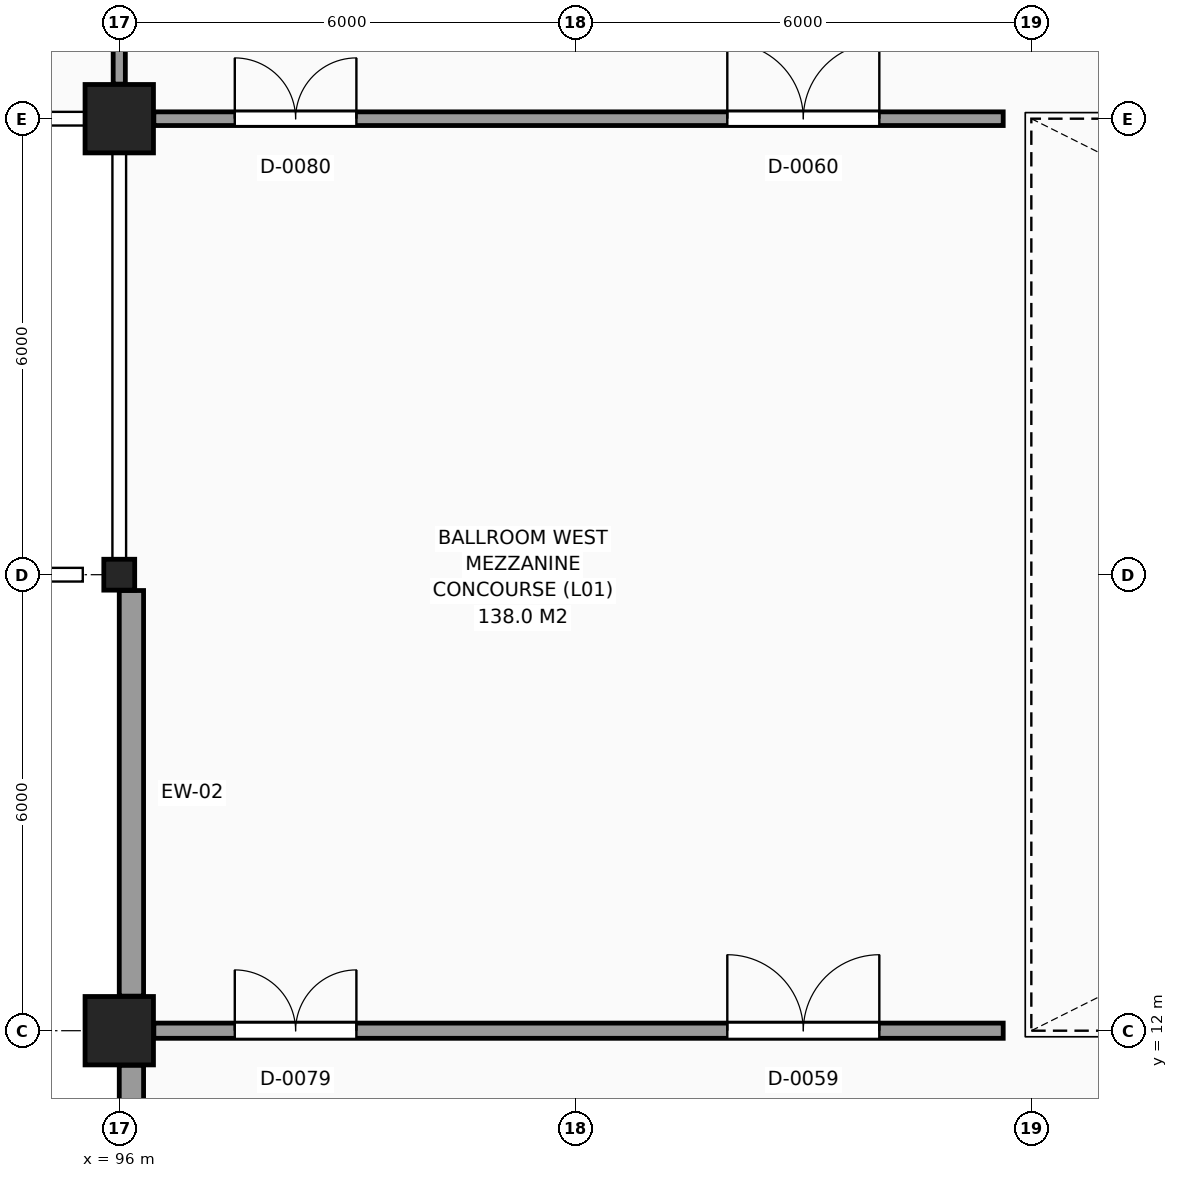
"""IFC4 building model, lengths in metres.
Left out: names, types, materials, properties, quantities, classifications, styles, units other than length and angle.
Written with IfcOpenShell. Run it as: python <this file> out.ifc"""

import sys

from ifc_helpers import new_model, si_unit, direction, frame, frame_2d, origin, origin_2d, place, context, subcontext, project, spatial, rectangle, hollow_circle, extrude, element, fill, save


model = new_model("IFC4")
c1 = context("Model", 3, precision=1e-05, world=origin(), true_north=direction((0.0, 1.0)))
c2 = subcontext(c1, "Body", "Model", "MODEL_VIEW")
j1 = project(units=[si_unit("LENGTHUNIT", "METRE"), si_unit("PLANEANGLEUNIT", "RADIAN")], contexts=[c1])
p1 = place(None, origin())
s1 = spatial("IfcSite", under=j1, at=p1, CompositionType="ELEMENT")
p2 = place(p1, origin())
s2 = spatial("IfcBuilding", under=s1, at=p2, CompositionType="ELEMENT")
p3 = place(p2, frame((0.0, 0.0, 6.0)))
s3 = spatial("IfcBuildingStorey", under=s2, at=p3, CompositionType="ELEMENT", Elevation=6.0)
p4 = place(p3, frame((96.0, 12.0, 0.0), z_axis=(0.0, 0.0, 1.0), x_axis=(1.0, 0.0, 0.0)))
e1 = element("IfcColumn", 1, at=p4, inside=s3, PredefinedType="COLUMN", context=c2, shape_type="SweptSolid", body=[
    extrude(rectangle(XDim=0.9, YDim=0.9, at=origin_2d()), origin(), (0.0, 0.0, 1.0), 4.5),
])
p5 = place(p3, frame((96.0, 18.0, 0.0), z_axis=(0.0, 0.0, 1.0), x_axis=(1.0, 0.0, 0.0)))
e2 = element("IfcColumn", 2, at=p5, inside=s3, PredefinedType="COLUMN", context=c2, shape_type="SweptSolid", body=[
    extrude(hollow_circle(Radius=0.203, WallThickness=0.02, at=origin_2d()), origin(), (0.0, 0.0, 1.0), 4.5),
])
p6 = place(p3, frame((96.0, 24.0, 0.0), z_axis=(0.0, 0.0, 1.0), x_axis=(1.0, 0.0, 0.0)))
e3 = element("IfcColumn", 3, at=p6, inside=s3, PredefinedType="COLUMN", context=c2, shape_type="SweptSolid", body=[
    extrude(rectangle(XDim=0.9, YDim=0.9, at=origin_2d()), origin(), (0.0, 0.0, 1.0), 4.5),
])
p7 = place(p3, frame((96.16, 17.792, 0.0), z_axis=(0.0, 0.0, 1.0), x_axis=(0.0, -1.0, 0.0)))
e4 = element("IfcWall", 4, at=p7, inside=s3, PredefinedType="SOLIDWALL", context=c2, shape_type="SweptSolid", body=[
    extrude(rectangle(XDim=5.337, YDim=0.32, at=frame_2d((2.668, 0.0))), origin(), (0.0, 0.0, 1.0), 3.47),
])
p8 = place(p3, frame((96.16, 11.545, 0.0), z_axis=(0.0, 0.0, 1.0), x_axis=(0.0, -1.0, 0.0)))
e5 = element("IfcWall", 5, at=p8, inside=s3, PredefinedType="SOLIDWALL", context=c2, shape_type="SweptSolid", body=[
    extrude(rectangle(XDim=5.09, YDim=0.32, at=frame_2d((2.545, 0.0))), origin(), (0.0, 0.0, 1.0), 3.47),
])
p9 = place(p3, frame((96.0, 24.455, 0.0), z_axis=(0.0, 0.0, 1.0), x_axis=(0.0, 1.0, 0.0)))
e6 = element("IfcWall", 6, at=p9, inside=s3, PredefinedType="PARTITIONING", context=c2, shape_type="SweptSolid", body=[
    extrude(rectangle(XDim=5.09, YDim=0.16, at=frame_2d((2.545, 0.0))), origin(), (0.0, 0.0, 1.0), 3.42),
])
p10 = place(p3, frame((96.455, 12.0, 0.0), z_axis=(0.0, 0.0, 1.0), x_axis=(1.0, 0.0, 0.0)))
e7 = element("IfcWall", 7, at=p10, inside=s3, PredefinedType="PARTITIONING", context=c2, shape_type="SweptSolid", body=[
    extrude(rectangle(XDim=11.175, YDim=0.2, at=frame_2d((5.587, 0.0))), origin(), (0.0, 0.0, 1.0), 4.22),
])
p11 = place(p10, frame((7.545, 0.0, 0.0)))
e8 = element("IfcOpeningElement", 8, at=p11, cuts=e7, PredefinedType="OPENING", context=c2, shape_type="SweptSolid", body=[
    extrude(rectangle(XDim=2.0, YDim=2.45, at=frame_2d((1.0, 1.225))), frame((0.0, 0.11, 0.0), z_axis=(0.0, -1.0, 0.0), x_axis=(1.0, 0.0, 0.0)), (0.0, 0.0, 1.0), 0.22),
])
p12 = place(p10, frame((1.065, 0.0, 0.0)))
e9 = element("IfcOpeningElement", 9, at=p12, cuts=e7, PredefinedType="OPENING", context=c2, shape_type="SweptSolid", body=[
    extrude(rectangle(XDim=1.6, YDim=2.25, at=frame_2d((0.8, 1.125))), frame((0.0, 0.11, 0.0), z_axis=(0.0, -1.0, 0.0), x_axis=(1.0, 0.0, 0.0)), (0.0, 0.0, 1.0), 0.22),
])
p13 = place(p3, frame((96.455, 24.0, 0.0), z_axis=(0.0, 0.0, 1.0), x_axis=(1.0, 0.0, 0.0)))
e10 = element("IfcWall", 10, at=p13, inside=s3, PredefinedType="PARTITIONING", context=c2, shape_type="SweptSolid", body=[
    extrude(rectangle(XDim=11.175, YDim=0.18, at=frame_2d((5.587, 0.0))), origin(), (0.0, 0.0, 1.0), 4.22),
])
p14 = place(p13, frame((7.545, 0.0, 0.0)))
e11 = element("IfcOpeningElement", 11, at=p14, cuts=e10, PredefinedType="OPENING", context=c2, shape_type="SweptSolid", body=[
    extrude(rectangle(XDim=2.0, YDim=2.45, at=frame_2d((1.0, 1.225))), frame((0.0, 0.1, 0.0), z_axis=(0.0, -1.0, 0.0), x_axis=(1.0, 0.0, 0.0)), (0.0, 0.0, 1.0), 0.2),
])
p15 = place(p13, frame((1.065, 0.0, 0.0)))
e12 = element("IfcOpeningElement", 12, at=p15, cuts=e10, PredefinedType="OPENING", context=c2, shape_type="SweptSolid", body=[
    extrude(rectangle(XDim=1.6, YDim=2.25, at=frame_2d((0.8, 1.125))), frame((0.0, 0.1, 0.0), z_axis=(0.0, -1.0, 0.0), x_axis=(1.0, 0.0, 0.0)), (0.0, 0.0, 1.0), 0.2),
])
p16 = place(p11, origin())
e13 = element("IfcDoor", 13, at=p16, inside=s3, OperationType="DOUBLE_DOOR_SINGLE_SWING", PredefinedType="DOOR", context=c2, shape_type="SweptSolid", body=[
    extrude(rectangle(XDim=2.0, YDim=2.45, at=frame_2d((1.0, 1.225))), frame((0.0, 0.025, 0.0), z_axis=(0.0, -1.0, 0.0), x_axis=(1.0, 0.0, 0.0)), (0.0, 0.0, 1.0), 0.05),
])
fill(e8, e13)
p17 = place(p14, origin())
e14 = element("IfcDoor", 14, at=p17, inside=s3, OperationType="DOUBLE_DOOR_SINGLE_SWING", PredefinedType="DOOR", context=c2, shape_type="SweptSolid", body=[
    extrude(rectangle(XDim=2.0, YDim=2.45, at=frame_2d((1.0, 1.225))), frame((0.0, 0.025, 0.0), z_axis=(0.0, -1.0, 0.0), x_axis=(1.0, 0.0, 0.0)), (0.0, 0.0, 1.0), 0.05),
])
fill(e11, e14)
p18 = place(p12, origin())
e15 = element("IfcDoor", 15, at=p18, inside=s3, OperationType="DOUBLE_DOOR_SINGLE_SWING", PredefinedType="DOOR", context=c2, shape_type="SweptSolid", body=[
    extrude(rectangle(XDim=1.6, YDim=2.25, at=frame_2d((0.8, 1.125))), frame((0.0, 0.025, 0.0), z_axis=(0.0, -1.0, 0.0), x_axis=(1.0, 0.0, 0.0)), (0.0, 0.0, 1.0), 0.05),
])
fill(e9, e15)
p19 = place(p15, origin())
e16 = element("IfcDoor", 16, at=p19, inside=s3, OperationType="DOUBLE_DOOR_SINGLE_SWING", PredefinedType="DOOR", context=c2, shape_type="SweptSolid", body=[
    extrude(rectangle(XDim=1.6, YDim=2.25, at=frame_2d((0.8, 1.125))), frame((0.0, 0.025, 0.0), z_axis=(0.0, -1.0, 0.0), x_axis=(1.0, 0.0, 0.0)), (0.0, 0.0, 1.0), 0.05),
])
fill(e12, e16)
save(model, sys.argv[1])
